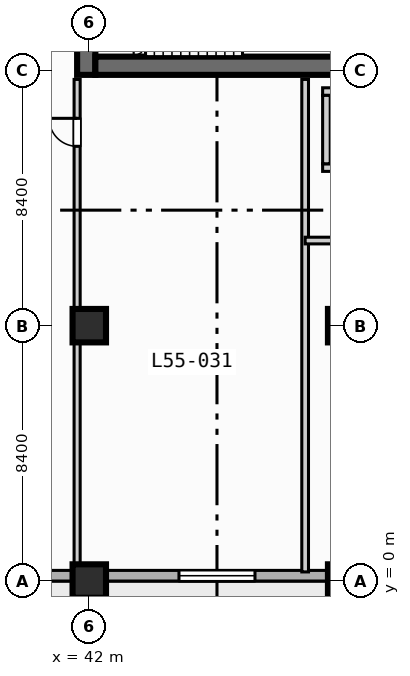
"""IFC4 building model, lengths in metres.
Left out: names, types, materials, properties, quantities, classifications, styles, units other than length and angle.
Written with IfcOpenShell. Run it as: python <this file> out.ifc"""

import sys

from ifc_helpers import new_model, si_unit, direction, frame, frame_2d, origin, origin_2d, place, context, subcontext, project, spatial, rectangle, extrude, element, fill, save


model = new_model("IFC4")
c1 = context("Model", 3, precision=1e-05, world=origin(), true_north=direction((0.0, 1.0)))
c2 = subcontext(c1, "Body", "Model", "MODEL_VIEW")
j1 = project(units=[si_unit("LENGTHUNIT", "METRE"), si_unit("PLANEANGLEUNIT", "RADIAN")], contexts=[c1])
p1 = place(None, origin())
s1 = spatial("IfcSite", under=j1, at=p1, CompositionType="ELEMENT")
p2 = place(p1, origin())
s2 = spatial("IfcBuilding", under=s1, at=p2, CompositionType="ELEMENT")
p3 = place(p2, frame((0.0, 0.0, 224.0)))
s3 = spatial("IfcBuildingStorey", under=s2, at=p3, CompositionType="ELEMENT", Elevation=224.0)
p4 = place(p3, frame((41.9, 16.65, 0.0), z_axis=(0.0, 0.0, 1.0), x_axis=(0.0, 1.0, 0.0)))
e1 = element("IfcWall", 1, at=p4, inside=s3, PredefinedType="SHEAR", context=c2, shape_type="SweptSolid", body=[
    extrude(rectangle(XDim=1.35, YDim=0.6, at=frame_2d((0.675, 0.0))), origin(), (0.0, 0.0, 1.0), 3.75),
])
p5 = place(p3, frame((42.2, 16.95, 0.0), z_axis=(0.0, 0.0, 1.0), x_axis=(1.0, 0.0, 0.0)))
e2 = element("IfcWall", 2, at=p5, inside=s3, PredefinedType="SHEAR", context=c2, shape_type="SweptSolid", body=[
    extrude(rectangle(XDim=16.35, YDim=0.6, at=frame_2d((8.175, 0.0))), origin(), (0.0, 0.0, 1.0), 3.75),
])
for number, where, z_axis, x_axis in (
    (3, (42.0, 0.0, 0.0), (0.0, 0.0, 1.0), (1.0, 0.0, 0.0)),
    (4, (42.0, 8.4, 0.0), (0.0, 0.0, 1.0), (1.0, 0.0, 0.0)),
    (5, (50.4, 0.0, 0.0), (0.0, 0.0, 1.0), (1.0, 0.0, 0.0)),
    (6, (50.4, 8.4, 0.0), (0.0, 0.0, 1.0), (1.0, 0.0, 0.0)),
):
    element("IfcColumn", number, at=place(p3, frame(where, z_axis=z_axis, x_axis=x_axis)), inside=s3, PredefinedType="COLUMN", context=c2, shape_type="SweptSolid", body=[
        extrude(rectangle(XDim=1.1, YDim=1.1, at=origin_2d()), origin(), (0.0, 0.0, 1.0), 4.2),
    ])
p6 = place(p3, frame((72.425, 0.175, 0.0), z_axis=(0.0, 0.0, 1.0), x_axis=(-1.0, 0.0, 0.0)))
e7 = element("IfcWall", 7, at=p6, inside=s3, PredefinedType="STANDARD", context=c2, shape_type="SweptSolid", body=[
    extrude(rectangle(XDim=69.25, YDim=0.35, at=frame_2d((34.625, 0.0))), origin(), (0.0, 0.0, 1.0), 3.75),
])
p7 = place(p6, frame((50.725, 0.0, 0.0)))
e8 = element("IfcOpeningElement", 8, at=p7, cuts=e7, PredefinedType="OPENING", context=c2, shape_type="SweptSolid", body=[
    extrude(rectangle(XDim=1.4, YDim=2.2, at=frame_2d((0.7, 1.1))), frame((0.0, 0.185, 0.0), z_axis=(0.0, -1.0, 0.0), x_axis=(1.0, 0.0, 0.0)), (0.0, 0.0, 1.0), 0.37),
])
p8 = place(p6, frame((24.975, 0.0, 0.85)))
e9 = element("IfcOpeningElement", 9, at=p8, cuts=e7, PredefinedType="OPENING", context=c2, shape_type="SweptSolid", body=[
    extrude(rectangle(XDim=2.5, YDim=2.2, at=frame_2d((1.25, 1.1))), frame((0.0, 0.185, 0.0), z_axis=(0.0, -1.0, 0.0), x_axis=(1.0, 0.0, 0.0)), (0.0, 0.0, 1.0), 0.37),
])
p9 = place(p6, frame((8.175, 0.0, 0.85)))
e10 = element("IfcOpeningElement", 10, at=p9, cuts=e7, PredefinedType="OPENING", context=c2, shape_type="SweptSolid", body=[
    extrude(rectangle(XDim=2.5, YDim=2.2, at=frame_2d((1.25, 1.1))), frame((0.0, 0.185, 0.0), z_axis=(0.0, -1.0, 0.0), x_axis=(1.0, 0.0, 0.0)), (0.0, 0.0, 1.0), 0.37),
])
p10 = place(p3, frame((49.675, 13.6, 0.0), z_axis=(0.0, 0.0, 1.0), x_axis=(1.0, 0.0, 0.0)))
e11 = element("IfcWall", 11, at=p10, inside=s3, PredefinedType="SOLIDWALL", context=c2, shape_type="SweptSolid", body=[
    extrude(rectangle(XDim=2.25, YDim=0.25, at=frame_2d((1.125, 0.0))), origin(), (0.0, 0.0, 1.0), 3.75),
])
p11 = place(p10, frame((0.4, 0.0, 0.0)))
e12 = element("IfcOpeningElement", 12, at=p11, cuts=e11, PredefinedType="OPENING", context=c2, shape_type="SweptSolid", body=[
    extrude(rectangle(XDim=1.1, YDim=2.15, at=frame_2d((0.55, 1.075))), frame((0.0, 0.135, 0.0), z_axis=(0.0, -1.0, 0.0), x_axis=(1.0, 0.0, 0.0)), (0.0, 0.0, 1.0), 0.27),
])
for number, where, z_axis, x_axis in (
    (13, (49.675, 16.1, 0.0), (0.0, 0.0, 1.0), (1.0, 0.0, 0.0)),
    (14, (49.8, 13.725, 0.0), (0.0, 0.0, 1.0), (0.0, 1.0, 0.0)),
):
    element("IfcWall", number, at=place(p3, frame(where, z_axis=z_axis, x_axis=x_axis)), inside=s3, PredefinedType="SOLIDWALL", context=c2, shape_type="SweptSolid", body=[
        extrude(rectangle(XDim=2.25, YDim=0.25, at=frame_2d((1.125, 0.0))), origin(), (0.0, 0.0, 1.0), 3.75),
    ])
p12 = place(p3, frame((41.6, 0.3, 0.0), z_axis=(0.0, 0.0, 1.0), x_axis=(0.0, 1.0, 0.0)))
e15 = element("IfcWall", 15, at=p12, inside=s3, PredefinedType="PARTITIONING", context=c2, shape_type="SweptSolid", body=[
    extrude(rectangle(XDim=16.2, YDim=0.2, at=frame_2d((8.1, 0.0))), origin(), (0.0, 0.0, 1.0), 3.75),
])
p13 = place(p12, frame((14.0, 0.0, 0.0)))
e16 = element("IfcOpeningElement", 16, at=p13, cuts=e15, PredefinedType="OPENING", context=c2, shape_type="SweptSolid", body=[
    extrude(rectangle(XDim=0.92, YDim=2.1, at=frame_2d((0.46, 1.05))), frame((0.0, 0.11, 0.0), z_axis=(0.0, -1.0, 0.0), x_axis=(1.0, 0.0, 0.0)), (0.0, 0.0, 1.0), 0.22),
])
p14 = place(p3, frame((49.1, 0.3, 0.0), z_axis=(0.0, 0.0, 1.0), x_axis=(0.0, 1.0, 0.0)))
e17 = element("IfcWall", 17, at=p14, inside=s3, PredefinedType="PARTITIONING", context=c2, shape_type="SweptSolid", body=[
    extrude(rectangle(XDim=16.2, YDim=0.22, at=frame_2d((8.1, 0.0))), origin(), (0.0, 0.0, 1.0), 3.75),
])
p15 = place(p3, frame((49.1, 11.2, 0.0), z_axis=(0.0, 0.0, 1.0), x_axis=(1.0, 0.0, 0.0)))
e18 = element("IfcWall", 18, at=p15, inside=s3, PredefinedType="PARTITIONING", context=c2, shape_type="SweptSolid", body=[
    extrude(rectangle(XDim=9.3, YDim=0.22, at=frame_2d((4.65, 0.0))), origin(), (0.0, 0.0, 1.0), 3.75),
])
p16 = place(p8, origin())
e19 = element("IfcWindow", 19, at=p16, inside=s3, PartitioningType="SINGLE_PANEL", PredefinedType="WINDOW", context=c2, shape_type="SweptSolid", body=[
    extrude(rectangle(XDim=2.5, YDim=2.2, at=frame_2d((1.25, 1.1))), frame((0.0, 0.03, 0.0), z_axis=(0.0, -1.0, 0.0), x_axis=(1.0, 0.0, 0.0)), (0.0, 0.0, 1.0), 0.06),
])
fill(e9, e19)
p17 = place(p13, origin())
e20 = element("IfcDoor", 20, at=p17, inside=s3, OperationType="SINGLE_SWING_RIGHT", PredefinedType="DOOR", context=c2, shape_type="SweptSolid", body=[
    extrude(rectangle(XDim=0.92, YDim=2.1, at=frame_2d((0.46, 1.05))), frame((0.0, 0.025, 0.0), z_axis=(0.0, -1.0, 0.0), x_axis=(1.0, 0.0, 0.0)), (0.0, 0.0, 1.0), 0.05),
])
fill(e16, e20)
save(model, sys.argv[1])
